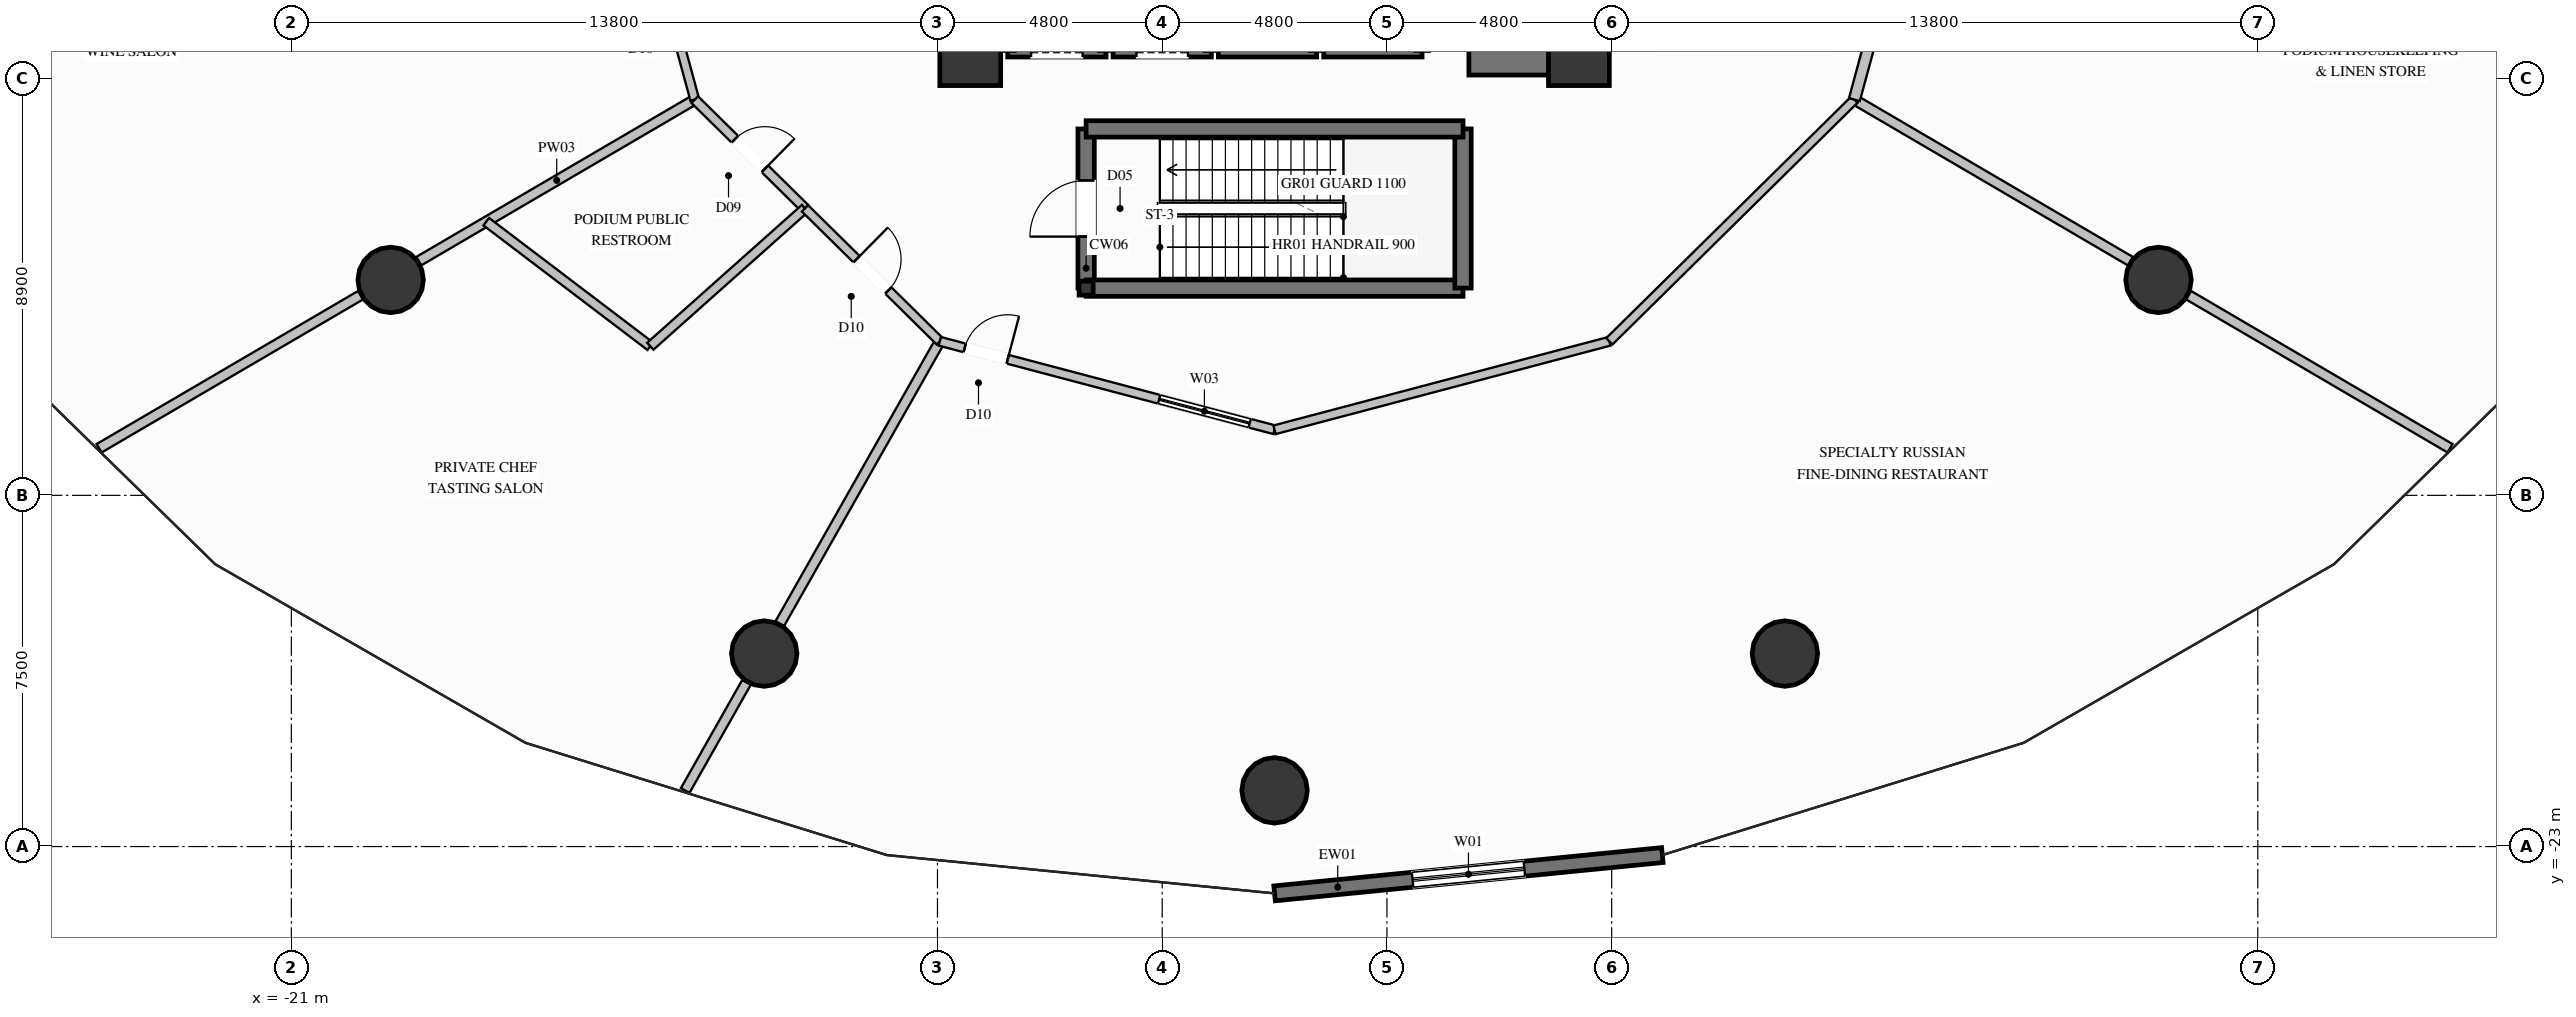
"""IFC4 building model, lengths in metres.
Left out: names, types, materials, properties, quantities, classifications, styles, units other than length and angle.
Written with IfcOpenShell. Run it as: python <this file> out.ifc"""

import sys

from ifc_helpers import new_model, si_unit, direction, frame, frame_2d, origin, origin_2d, place, context, subcontext, project, spatial, rectangle, hollow_rectangle, circle, extrude, element, fill, save


model = new_model("IFC4")
c1 = context("Model", 3, precision=1e-05, world=origin(), true_north=direction((0.0, 1.0)))
c2 = subcontext(c1, "Body", "Model", "MODEL_VIEW")
j1 = project(units=[si_unit("LENGTHUNIT", "METRE"), si_unit("PLANEANGLEUNIT", "RADIAN")], contexts=[c1])
p1 = place(None, origin())
s1 = spatial("IfcSite", under=j1, at=p1, CompositionType="ELEMENT")
p2 = place(p1, origin())
s2 = spatial("IfcBuilding", under=s1, at=p2, CompositionType="ELEMENT")
p3 = place(p2, frame((0.0, 0.0, 7.2)))
s3 = spatial("IfcBuildingStorey", under=s2, at=p3, CompositionType="ELEMENT", Elevation=7.2)
for number, where, z_axis, x_axis in (
    (1, (-6.5, -6.1, 0.0), (0.0, 0.0, 1.0), (1.0, 0.0, 0.0)),
    (2, (6.5, -6.1, 0.0), (0.0, 0.0, 1.0), (1.0, 0.0, 0.0)),
):
    element("IfcColumn", number, at=place(p3, frame(where, z_axis=z_axis, x_axis=x_axis)), inside=s3, PredefinedType="COLUMN", context=c2, shape_type="SweptSolid", body=[
        extrude(rectangle(XDim=1.3, YDim=1.3, at=origin_2d()), origin(), (0.0, 0.0, 1.0), 5.4),
    ])
p4 = place(p3, frame((-6.075, -6.1, 0.0), z_axis=(0.0, 0.0, 1.0), x_axis=(1.0, 0.0, 0.0)))
e3 = element("IfcWall", 3, at=p4, inside=s3, PredefinedType="SHEAR", context=c2, shape_type="SweptSolid", body=[
    extrude(rectangle(XDim=0.225, YDim=0.85, at=frame_2d((0.112, 0.0))), origin(), (0.0, 0.0, 1.0), 5.4),
])
p5 = place(p3, frame((4.15, -6.1, 0.0), z_axis=(0.0, 0.0, 1.0), x_axis=(1.0, 0.0, 0.0)))
e4 = element("IfcWall", 4, at=p5, inside=s3, PredefinedType="SHEAR", context=c2, shape_type="SweptSolid", body=[
    extrude(rectangle(XDim=1.925, YDim=0.85, at=frame_2d((0.962, 0.0))), origin(), (0.0, 0.0, 1.0), 5.4),
])
p6 = place(p3, frame((-6.5, -6.525, 0.0), z_axis=(0.0, 0.0, 1.0), x_axis=(0.0, 1.0, 0.0)))
e5 = element("IfcWall", 5, at=p6, inside=s3, PredefinedType="SHEAR", context=c2, shape_type="SweptSolid", body=[
    extrude(rectangle(XDim=3.175, YDim=0.85, at=frame_2d((1.587, 0.0))), origin(), (0.0, 0.0, 1.0), 5.4),
])
p7 = place(p3, frame((6.5, -6.525, 0.0), z_axis=(0.0, 0.0, 1.0), x_axis=(0.0, 1.0, 0.0)))
e6 = element("IfcWall", 6, at=p7, inside=s3, PredefinedType="SHEAR", context=c2, shape_type="SweptSolid", body=[
    extrude(rectangle(XDim=4.175, YDim=0.85, at=frame_2d((2.087, 0.0))), origin(), (0.0, 0.0, 1.0), 5.4),
])
for number, where, z_axis, x_axis in (
    (7, (-18.879, -10.9, 0.0), (0.0, 0.0, 1.0), (1.0, 0.0, 0.0)),
    (8, (-10.9, -18.879, 0.0), (0.0, 0.0, 1.0), (1.0, 0.0, 0.0)),
    (9, (0.0, -21.8, 0.0), (0.0, 0.0, 1.0), (1.0, 0.0, 0.0)),
    (10, (10.9, -18.879, 0.0), (0.0, 0.0, 1.0), (1.0, 0.0, 0.0)),
    (11, (18.879, -10.9, 0.0), (0.0, 0.0, 1.0), (1.0, 0.0, 0.0)),
):
    element("IfcColumn", number, at=place(p3, frame(where, z_axis=z_axis, x_axis=x_axis)), inside=s3, PredefinedType="COLUMN", context=c2, shape_type="SweptSolid", body=[
        extrude(circle(Radius=0.7, at=origin_2d()), origin(), (0.0, 0.0, 1.0), 5.4),
    ])
p8 = place(p3, frame((-4.025, -11.075, 0.0), z_axis=(0.0, 0.0, 1.0), x_axis=(1.0, 0.0, 0.0)))
e12 = element("IfcColumn", 12, at=p8, inside=s3, PredefinedType="COLUMN", context=c2, shape_type="SweptSolid", body=[
    extrude(hollow_rectangle(XDim=0.3, YDim=0.3, WallThickness=0.016, at=origin_2d()), origin(), (0.0, 0.0, 1.0), 5.4),
])
p9 = place(p3, frame((8.282, -23.182, 0.0), z_axis=(0.0, 0.0, 1.0), x_axis=(-0.995156424186, -0.098304076215, 0.0)))
e13 = element("IfcWall", 13, at=p9, inside=s3, PredefinedType="SOLIDWALL", context=c2, shape_type="SweptSolid", body=[
    extrude(rectangle(XDim=8.322, YDim=0.32, at=frame_2d((4.161, 0.0))), origin(), (0.0, 0.0, 1.0), 4.98),
])
p10 = place(p9, frame((2.961, 0.0, 0.65)))
e14 = element("IfcOpeningElement", 14, at=p10, cuts=e13, PredefinedType="OPENING", context=c2, shape_type="SweptSolid", body=[
    extrude(rectangle(XDim=2.4, YDim=3.2, at=frame_2d((1.2, 1.6))), frame((0.0, 0.17, 0.0), z_axis=(0.0, -1.0, 0.0), x_axis=(1.0, 0.0, 0.0)), (0.0, 0.0, 1.0), 0.34),
])
p11 = place(p3, frame((-5.7, -6.0, 0.0), z_axis=(0.0, 0.0, 1.0), x_axis=(1.0, 0.0, 0.0)))
e15 = element("IfcWall", 15, at=p11, inside=s3, PredefinedType="SOLIDWALL", context=c2, shape_type="SweptSolid", body=[
    extrude(rectangle(XDim=2.1, YDim=0.28, at=frame_2d((1.05, 0.0))), origin(), (0.0, 0.0, 1.0), 4.98),
])
p12 = place(p11, frame((0.5, 0.0, 0.0)))
e16 = element("IfcOpeningElement", 16, at=p12, cuts=e15, PredefinedType="OPENING", context=c2, shape_type="SweptSolid", body=[
    extrude(rectangle(XDim=1.1, YDim=2.2, at=frame_2d((0.55, 1.1))), frame((0.0, 0.15, 0.0), z_axis=(0.0, -1.0, 0.0), x_axis=(1.0, 0.0, 0.0)), (0.0, 0.0, 1.0), 0.3),
])
p13 = place(p3, frame((-3.45, -6.0, 0.0), z_axis=(0.0, 0.0, 1.0), x_axis=(1.0, 0.0, 0.0)))
e17 = element("IfcWall", 17, at=p13, inside=s3, PredefinedType="SOLIDWALL", context=c2, shape_type="SweptSolid", body=[
    extrude(rectangle(XDim=2.1, YDim=0.28, at=frame_2d((1.05, 0.0))), origin(), (0.0, 0.0, 1.0), 4.98),
])
p14 = place(p13, frame((0.5, 0.0, 0.0)))
e18 = element("IfcOpeningElement", 18, at=p14, cuts=e17, PredefinedType="OPENING", context=c2, shape_type="SweptSolid", body=[
    extrude(rectangle(XDim=1.1, YDim=2.2, at=frame_2d((0.55, 1.1))), frame((0.0, 0.15, 0.0), z_axis=(0.0, -1.0, 0.0), x_axis=(1.0, 0.0, 0.0)), (0.0, 0.0, 1.0), 0.3),
])
for number, where, z_axis, x_axis in (
    (19, (-1.2, -6.0, 0.0), (0.0, 0.0, 1.0), (1.0, 0.0, 0.0)),
    (20, (1.05, -6.0, 0.0), (0.0, 0.0, 1.0), (1.0, 0.0, 0.0)),
):
    element("IfcWall", number, at=place(p3, frame(where, z_axis=z_axis, x_axis=x_axis)), inside=s3, PredefinedType="SOLIDWALL", context=c2, shape_type="SweptSolid", body=[
        extrude(rectangle(XDim=2.1, YDim=0.28, at=frame_2d((1.05, 0.0))), origin(), (0.0, 0.0, 1.0), 4.98),
    ])
p15 = place(p3, frame((-4.025, -11.075, 0.0), z_axis=(0.0, 0.0, 1.0), x_axis=(0.0, 1.0, 0.0)))
e21 = element("IfcWall", 21, at=p15, inside=s3, PredefinedType="SOLIDWALL", context=c2, shape_type="SweptSolid", body=[
    extrude(rectangle(XDim=3.4, YDim=0.35, at=frame_2d((1.7, 0.0))), origin(), (0.0, 0.0, 1.0), 4.98),
])
p16 = place(p15, frame((1.1, 0.0, 0.0)))
e22 = element("IfcOpeningElement", 22, at=p16, cuts=e21, PredefinedType="OPENING", context=c2, shape_type="SweptSolid", body=[
    extrude(rectangle(XDim=1.2, YDim=2.2, at=frame_2d((0.6, 1.1))), frame((0.0, 0.185, 0.0), z_axis=(0.0, -1.0, 0.0), x_axis=(1.0, 0.0, 0.0)), (0.0, 0.0, 1.0), 0.37),
])
p17 = place(p3, frame((-4.025, -11.075, 0.0), z_axis=(0.0, 0.0, 1.0), x_axis=(1.0, 0.0, 0.0)))
e23 = element("IfcWall", 23, at=p17, inside=s3, PredefinedType="SOLIDWALL", context=c2, shape_type="SweptSolid", body=[
    extrude(rectangle(XDim=8.05, YDim=0.35, at=frame_2d((4.025, 0.0))), origin(), (0.0, 0.0, 1.0), 4.98),
])
p18 = place(p3, frame((4.025, -11.075, 0.0), z_axis=(0.0, 0.0, 1.0), x_axis=(0.0, 1.0, 0.0)))
e24 = element("IfcWall", 24, at=p18, inside=s3, PredefinedType="SOLIDWALL", context=c2, shape_type="SweptSolid", body=[
    extrude(rectangle(XDim=3.4, YDim=0.35, at=frame_2d((1.7, 0.0))), origin(), (0.0, 0.0, 1.0), 4.98),
])
p19 = place(p3, frame((4.025, -7.675, 0.0), z_axis=(0.0, 0.0, 1.0), x_axis=(-1.0, 0.0, 0.0)))
e25 = element("IfcWall", 25, at=p19, inside=s3, PredefinedType="SOLIDWALL", context=c2, shape_type="SweptSolid", body=[
    extrude(rectangle(XDim=8.05, YDim=0.35, at=frame_2d((4.025, 0.0))), origin(), (0.0, 0.0, 1.0), 4.98),
])
p20 = place(p3, frame((-12.384, -7.05, 0.0), z_axis=(0.0, 0.0, 1.0), x_axis=(-0.863101484719, -0.505030520934, 0.0)))
e26 = element("IfcWall", 26, at=p20, inside=s3, PredefinedType="PARTITIONING", context=c2, shape_type="SweptSolid", body=[
    extrude(rectangle(XDim=6.831, YDim=0.21, at=frame_2d((3.416, 0.0))), origin(), (0.0, 0.0, 1.0), 4.191),
])
p21 = place(p3, frame((-19.521, -11.226, 0.0), z_axis=(0.0, 0.0, 1.0), x_axis=(-0.863028108689, -0.505155900304, 0.0)))
e27 = element("IfcWall", 27, at=p21, inside=s3, PredefinedType="PARTITIONING", context=c2, shape_type="SweptSolid", body=[
    extrude(rectangle(XDim=6.471, YDim=0.21, at=frame_2d((3.236, 0.0))), origin(), (0.0, 0.0, 1.0), 4.98),
])
p22 = place(p3, frame((-7.15, -12.211, 0.0), z_axis=(0.0, 0.0, 1.0), x_axis=(-0.493203653226, -0.869913878752, 0.0)))
e28 = element("IfcWall", 28, at=p22, inside=s3, PredefinedType="PARTITIONING", context=c2, shape_type="SweptSolid", body=[
    extrude(rectangle(XDim=6.931, YDim=0.21, at=frame_2d((3.465, 0.0))), origin(), (0.0, 0.0, 1.0), 4.191),
])
p23 = place(p3, frame((-11.277, -19.492, 0.0), z_axis=(0.0, 0.0, 1.0), x_axis=(-0.493197981082, -0.869917094588, 0.0)))
e29 = element("IfcWall", 29, at=p23, inside=s3, PredefinedType="PARTITIONING", context=c2, shape_type="SweptSolid", body=[
    extrude(rectangle(XDim=2.658, YDim=0.21, at=frame_2d((1.329, 0.0))), origin(), (0.0, 0.0, 1.0), 4.98),
])
p24 = place(p3, frame((12.384, -7.05, 0.0), z_axis=(0.0, 0.0, 1.0), x_axis=(0.863101484719, -0.505030520934, 0.0)))
e30 = element("IfcWall", 30, at=p24, inside=s3, PredefinedType="PARTITIONING", context=c2, shape_type="SweptSolid", body=[
    extrude(rectangle(XDim=6.831, YDim=0.21, at=frame_2d((3.416, 0.0))), origin(), (0.0, 0.0, 1.0), 4.191),
])
p25 = place(p3, frame((19.521, -11.226, 0.0), z_axis=(0.0, 0.0, 1.0), x_axis=(0.863028108689, -0.505155900304, 0.0)))
e31 = element("IfcWall", 31, at=p25, inside=s3, PredefinedType="PARTITIONING", context=c2, shape_type="SweptSolid", body=[
    extrude(rectangle(XDim=6.471, YDim=0.21, at=frame_2d((3.236, 0.0))), origin(), (0.0, 0.0, 1.0), 4.98),
])
p26 = place(p3, frame((-13.438, -3.172, 0.0), z_axis=(0.0, 0.0, 1.0), x_axis=(0.262269103922, -0.9649947757, 0.0)))
e32 = element("IfcWall", 32, at=p26, inside=s3, PredefinedType="PARTITIONING", context=c2, shape_type="SweptSolid", body=[
    extrude(rectangle(XDim=4.019, YDim=0.19, at=frame_2d((2.009, 0.0))), origin(), (0.0, 0.0, 1.0), 4.98),
])
p27 = place(p26, frame((1.534, 0.0, 0.0)))
e33 = element("IfcOpeningElement", 33, at=p27, cuts=e32, PredefinedType="OPENING", context=c2, shape_type="SweptSolid", body=[
    extrude(rectangle(XDim=0.95, YDim=2.1, at=frame_2d((0.475, 1.05))), frame((0.0, 0.105, 0.0), z_axis=(0.0, -1.0, 0.0), x_axis=(1.0, 0.0, 0.0)), (0.0, 0.0, 1.0), 0.21),
])
p28 = place(p3, frame((-12.384, -7.05, 0.0), z_axis=(0.0, 0.0, 1.0), x_axis=(0.712072104827, -0.70210634346, 0.0)))
e34 = element("IfcWall", 34, at=p28, inside=s3, PredefinedType="PLUMBINGWALL", context=c2, shape_type="SweptSolid", body=[
    extrude(rectangle(XDim=3.307, YDim=0.2, at=frame_2d((1.654, 0.0))), origin(), (0.0, 0.0, 1.0), 4.98),
])
p29 = place(p28, frame((1.204, 0.0, 0.0)))
e35 = element("IfcOpeningElement", 35, at=p29, cuts=e34, PredefinedType="OPENING", context=c2, shape_type="SweptSolid", body=[
    extrude(rectangle(XDim=0.9, YDim=2.1, at=frame_2d((0.45, 1.05))), frame((0.0, 0.11, 0.0), z_axis=(0.0, -1.0, 0.0), x_axis=(1.0, 0.0, 0.0)), (0.0, 0.0, 1.0), 0.22),
])
p30 = place(p3, frame((-16.837, -9.656, 0.0), z_axis=(0.0, 0.0, 1.0), x_axis=(0.79641562161, -0.60474966528, 0.0)))
e36 = element("IfcWall", 36, at=p30, inside=s3, PredefinedType="PLUMBINGWALL", context=c2, shape_type="SweptSolid", body=[
    extrude(rectangle(XDim=4.398, YDim=0.2, at=frame_2d((2.199, 0.0))), origin(), (0.0, 0.0, 1.0), 4.98),
])
p31 = place(p3, frame((-10.029, -9.372, 0.0), z_axis=(0.0, 0.0, 1.0), x_axis=(-0.746721111404, -0.66513726537, 0.0)))
e37 = element("IfcWall", 37, at=p31, inside=s3, PredefinedType="PLUMBINGWALL", context=c2, shape_type="SweptSolid", body=[
    extrude(rectangle(XDim=4.426, YDim=0.2, at=frame_2d((2.213, 0.0))), origin(), (0.0, 0.0, 1.0), 4.98),
])
p32 = place(p3, frame((-10.029, -9.372, 0.0), z_axis=(0.0, 0.0, 1.0), x_axis=(0.712070649597, -0.702107819343, 0.0)))
e38 = element("IfcWall", 38, at=p32, inside=s3, PredefinedType="PARTITIONING", context=c2, shape_type="SweptSolid", body=[
    extrude(rectangle(XDim=4.043, YDim=0.19, at=frame_2d((2.022, 0.0))), origin(), (0.0, 0.0, 1.0), 4.98),
])
p33 = place(p32, frame((1.547, 0.0, 0.0)))
e39 = element("IfcOpeningElement", 39, at=p33, cuts=e38, PredefinedType="OPENING", context=c2, shape_type="SweptSolid", body=[
    extrude(rectangle(XDim=0.95, YDim=2.1, at=frame_2d((0.475, 1.05))), frame((0.0, 0.105, 0.0), z_axis=(0.0, -1.0, 0.0), x_axis=(1.0, 0.0, 0.0)), (0.0, 0.0, 1.0), 0.21),
])
p34 = place(p3, frame((-7.15, -12.211, 0.0), z_axis=(0.0, 0.0, 1.0), x_axis=(0.966820901533, -0.255455170937, 0.0)))
e40 = element("IfcWall", 40, at=p34, inside=s3, PredefinedType="PARTITIONING", context=c2, shape_type="SweptSolid", body=[
    extrude(rectangle(XDim=7.395, YDim=0.19, at=frame_2d((3.698, 0.0))), origin(), (0.0, 0.0, 1.0), 4.558),
])
p35 = place(p34, frame((0.55, 0.0, 0.0)))
e41 = element("IfcOpeningElement", 41, at=p35, cuts=e40, PredefinedType="OPENING", context=c2, shape_type="SweptSolid", body=[
    extrude(rectangle(XDim=0.95, YDim=2.1, at=frame_2d((0.475, 1.05))), frame((0.0, 0.105, 0.0), z_axis=(0.0, -1.0, 0.0), x_axis=(1.0, 0.0, 0.0)), (0.0, 0.0, 1.0), 0.21),
])
p36 = place(p34, frame((4.845, 0.0, 0.9)))
e42 = element("IfcOpeningElement", 42, at=p36, cuts=e40, PredefinedType="OPENING", context=c2, shape_type="SweptSolid", body=[
    extrude(rectangle(XDim=2.0, YDim=1.6, at=frame_2d((1.0, 0.8))), frame((0.0, 0.105, 0.0), z_axis=(0.0, -1.0, 0.0), x_axis=(1.0, 0.0, 0.0)), (0.0, 0.0, 1.0), 0.21),
])
p37 = place(p3, frame((0.0, -14.1, 0.0), z_axis=(0.0, 0.0, 1.0), x_axis=(0.966820901533, 0.255455170937, 0.0)))
e43 = element("IfcWall", 43, at=p37, inside=s3, PredefinedType="PARTITIONING", context=c2, shape_type="SweptSolid", body=[
    extrude(rectangle(XDim=7.395, YDim=0.19, at=frame_2d((3.698, 0.0))), origin(), (0.0, 0.0, 1.0), 4.558),
])
p38 = place(p3, frame((7.15, -12.211, 0.0), z_axis=(0.0, 0.0, 1.0), x_axis=(0.712071304345, 0.702107155303, 0.0)))
e44 = element("IfcWall", 44, at=p38, inside=s3, PredefinedType="PARTITIONING", context=c2, shape_type="SweptSolid", body=[
    extrude(rectangle(XDim=7.351, YDim=0.19, at=frame_2d((3.675, 0.0))), origin(), (0.0, 0.0, 1.0), 4.98),
])
p39 = place(p3, frame((12.384, -7.05, 0.0), z_axis=(0.0, 0.0, 1.0), x_axis=(0.262260528785, 0.964997106235, 0.0)))
e45 = element("IfcWall", 45, at=p39, inside=s3, PredefinedType="PARTITIONING", context=c2, shape_type="SweptSolid", body=[
    extrude(rectangle(XDim=7.306, YDim=0.24, at=frame_2d((3.653, 0.0))), origin(), (0.0, 0.0, 1.0), 4.558),
])
p40 = place(p39, frame((3.178, 0.0, 0.0)))
e46 = element("IfcOpeningElement", 46, at=p40, cuts=e45, PredefinedType="OPENING", context=c2, shape_type="SweptSolid", body=[
    extrude(rectangle(XDim=0.95, YDim=2.1, at=frame_2d((0.475, 1.05))), frame((0.0, 0.13, 0.0), z_axis=(0.0, -1.0, 0.0), x_axis=(1.0, 0.0, 0.0)), (0.0, 0.0, 1.0), 0.26),
])
p41 = place(p10, origin())
e47 = element("IfcWindow", 47, at=p41, inside=s3, PartitioningType="SINGLE_PANEL", PredefinedType="WINDOW", context=c2, shape_type="SweptSolid", body=[
    extrude(rectangle(XDim=2.4, YDim=3.2, at=frame_2d((1.2, 1.6))), frame((0.0, 0.03, 0.0), z_axis=(0.0, -1.0, 0.0), x_axis=(1.0, 0.0, 0.0)), (0.0, 0.0, 1.0), 0.06),
])
fill(e14, e47)
p42 = place(p16, origin())
e48 = element("IfcDoor", 48, at=p42, inside=s3, OperationType="SINGLE_SWING_LEFT", PredefinedType="DOOR", context=c2, shape_type="SweptSolid", body=[
    extrude(rectangle(XDim=1.2, YDim=2.2, at=frame_2d((0.6, 1.1))), frame((0.0, 0.025, 0.0), z_axis=(0.0, -1.0, 0.0), x_axis=(1.0, 0.0, 0.0)), (0.0, 0.0, 1.0), 0.05),
])
fill(e22, e48)
p43 = place(p29, origin())
e49 = element("IfcDoor", 49, at=p43, inside=s3, OperationType="SINGLE_SWING_RIGHT", PredefinedType="DOOR", context=c2, shape_type="SweptSolid", body=[
    extrude(rectangle(XDim=0.9, YDim=2.1, at=frame_2d((0.45, 1.05))), frame((0.0, 0.025, 0.0), z_axis=(0.0, -1.0, 0.0), x_axis=(1.0, 0.0, 0.0)), (0.0, 0.0, 1.0), 0.05),
])
fill(e35, e49)
p44 = place(p33, origin())
e50 = element("IfcDoor", 50, at=p44, inside=s3, OperationType="SINGLE_SWING_LEFT", PredefinedType="DOOR", context=c2, shape_type="SweptSolid", body=[
    extrude(rectangle(XDim=0.95, YDim=2.1, at=frame_2d((0.475, 1.05))), frame((0.0, 0.025, 0.0), z_axis=(0.0, -1.0, 0.0), x_axis=(1.0, 0.0, 0.0)), (0.0, 0.0, 1.0), 0.05),
])
fill(e39, e50)
p45 = place(p35, origin())
e51 = element("IfcDoor", 51, at=p45, inside=s3, OperationType="SINGLE_SWING_RIGHT", PredefinedType="DOOR", context=c2, shape_type="SweptSolid", body=[
    extrude(rectangle(XDim=0.95, YDim=2.1, at=frame_2d((0.475, 1.05))), frame((0.0, 0.025, 0.0), z_axis=(0.0, -1.0, 0.0), x_axis=(1.0, 0.0, 0.0)), (0.0, 0.0, 1.0), 0.05),
])
fill(e41, e51)
p46 = place(p36, origin())
e52 = element("IfcWindow", 52, at=p46, inside=s3, PartitioningType="SINGLE_PANEL", PredefinedType="WINDOW", context=c2, shape_type="SweptSolid", body=[
    extrude(rectangle(XDim=2.0, YDim=1.6, at=frame_2d((1.0, 0.8))), frame((0.0, 0.03, 0.0), z_axis=(0.0, -1.0, 0.0), x_axis=(1.0, 0.0, 0.0)), (0.0, 0.0, 1.0), 0.06),
])
fill(e42, e52)
save(model, sys.argv[1])
